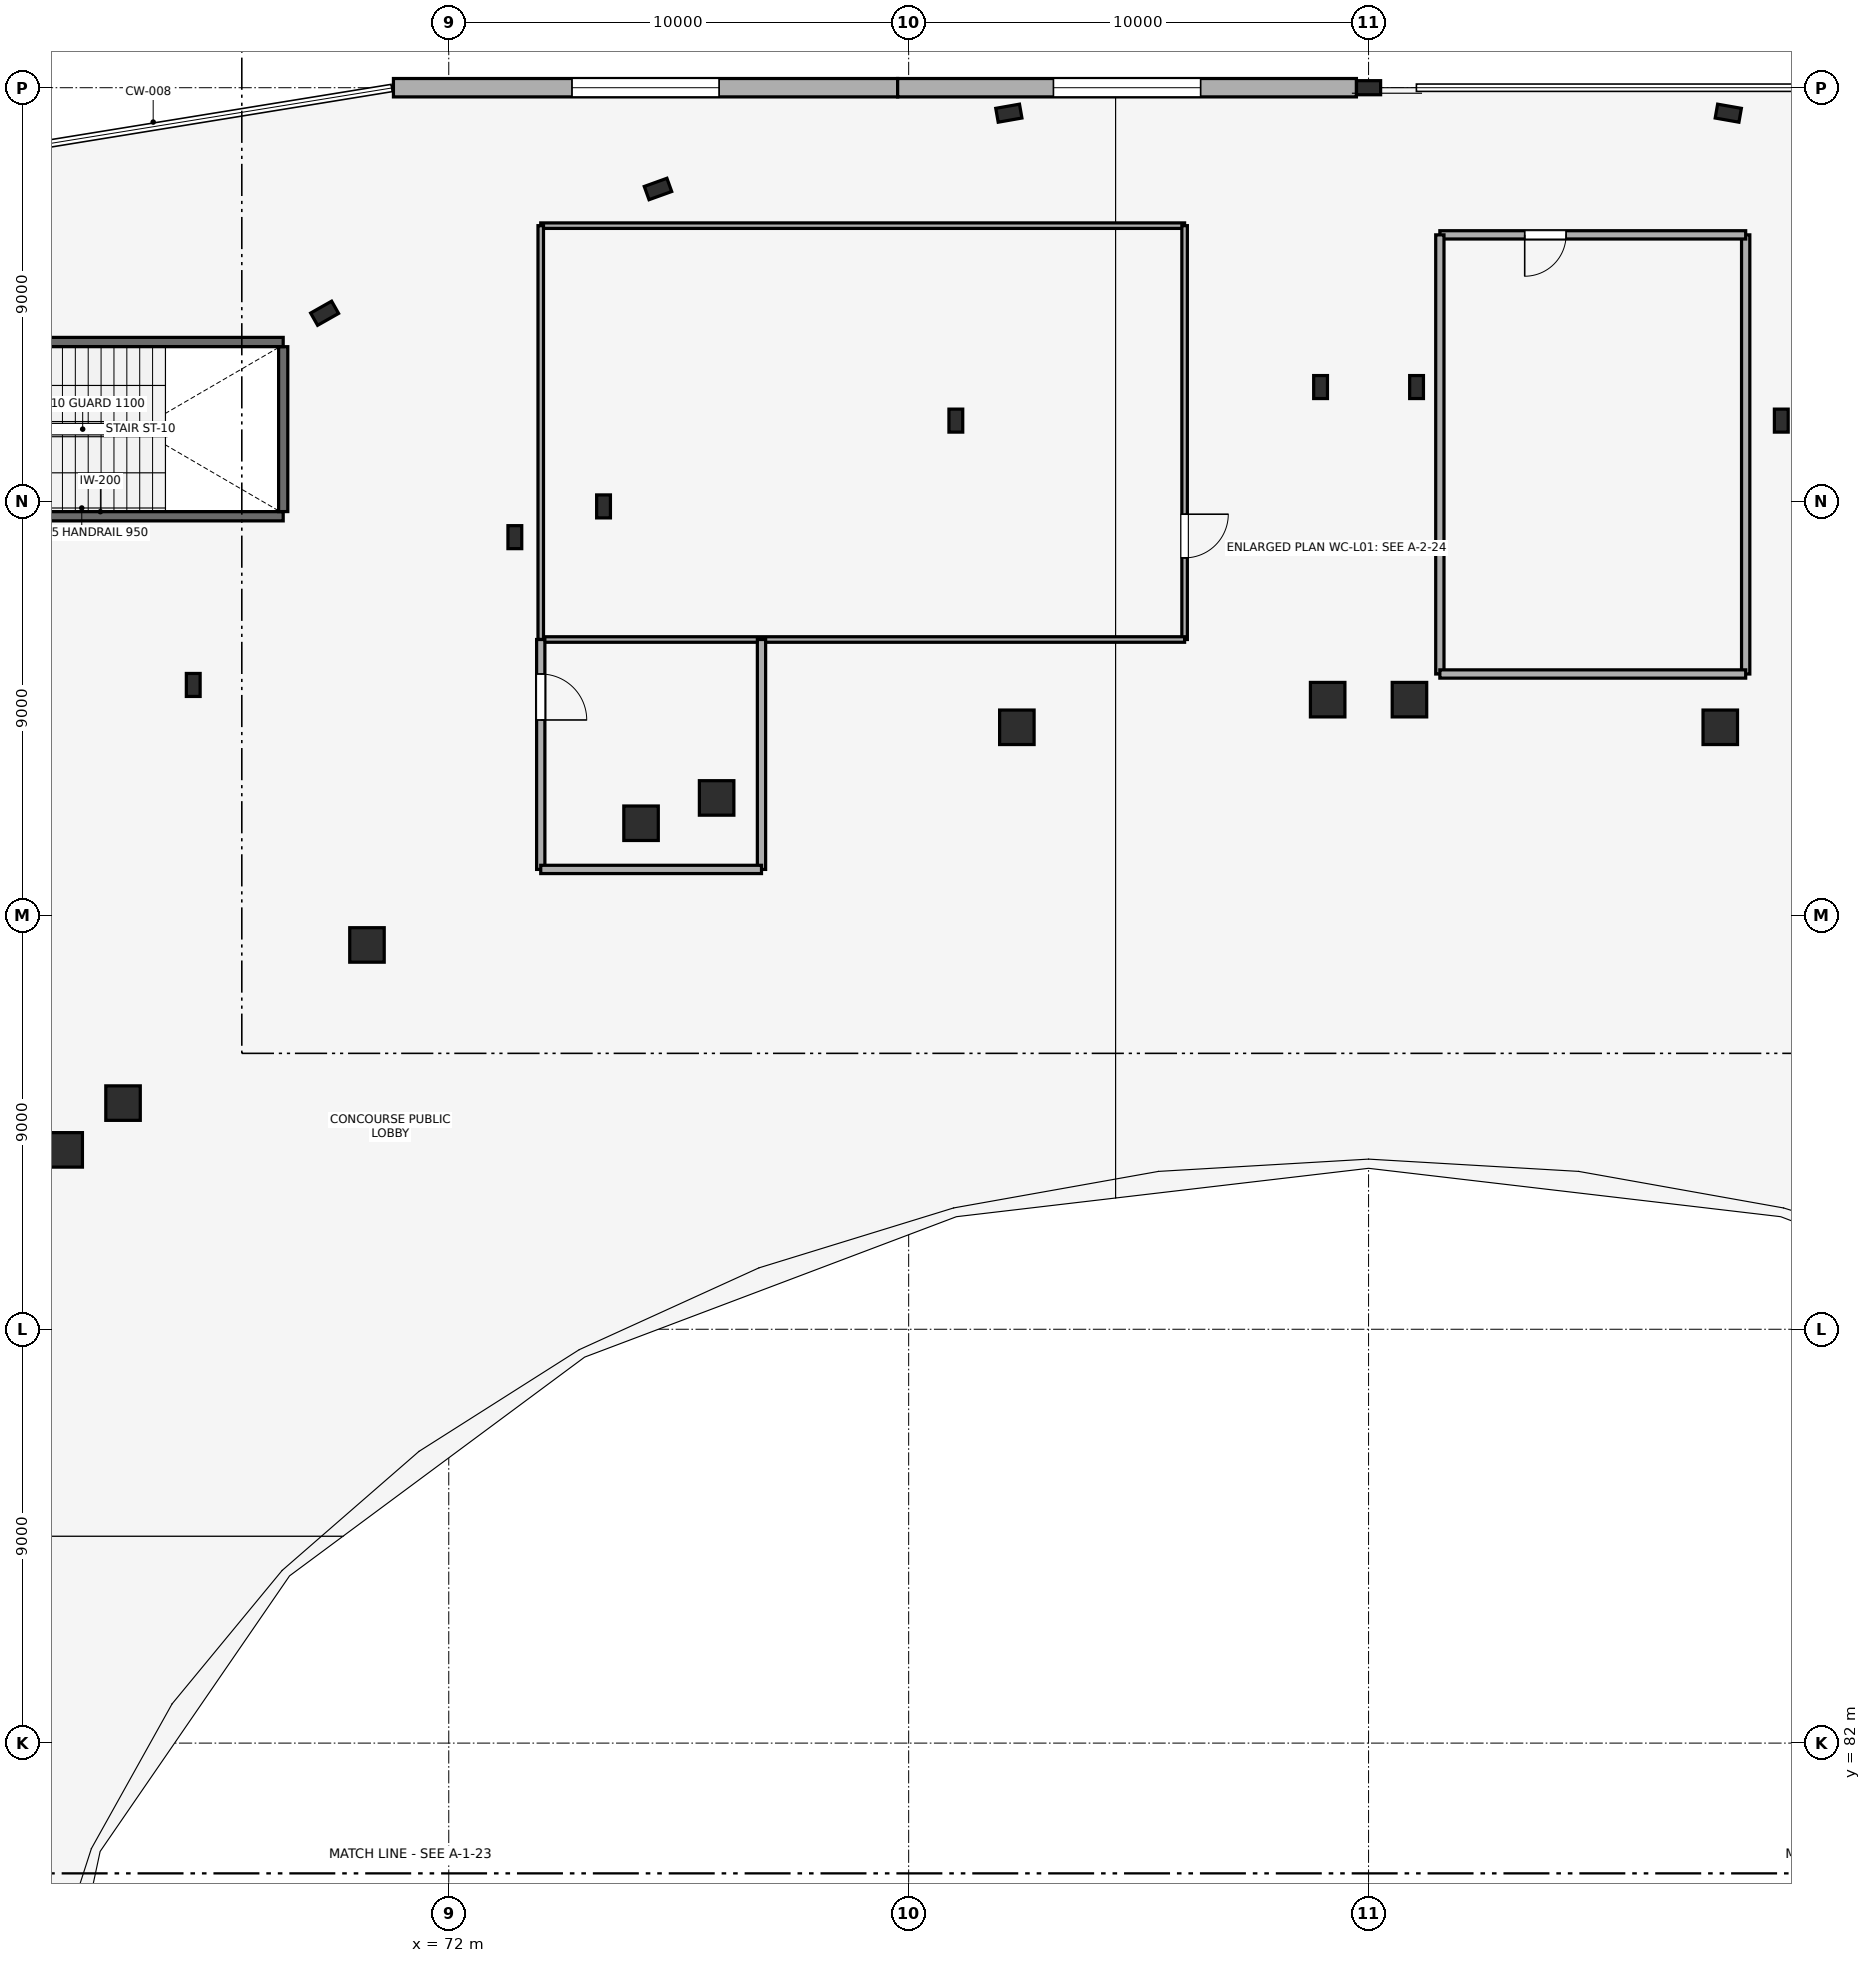
"""IFC4 building model, lengths in metres.
Left out: names, types, materials, properties, quantities, classifications, styles, units other than length and angle.
Written with IfcOpenShell. Run it as: python <this file> out.ifc"""

import sys

from ifc_helpers import new_model, si_unit, direction, frame, frame_2d, origin, origin_2d, place, context, subcontext, project, spatial, rectangle, i_section, extrude, element, fill, save


model = new_model("IFC4")
c1 = context("Model", 3, precision=1e-05, world=origin(), true_north=direction((0.0, 1.0)))
c2 = subcontext(c1, "Body", "Model", "MODEL_VIEW")
j1 = project(units=[si_unit("LENGTHUNIT", "METRE"), si_unit("PLANEANGLEUNIT", "RADIAN")], contexts=[c1])
p1 = place(None, origin())
s1 = spatial("IfcSite", under=j1, at=p1, CompositionType="ELEMENT")
p2 = place(p1, origin())
s2 = spatial("IfcBuilding", under=s1, at=p2, CompositionType="ELEMENT")
p3 = place(p2, frame((0.0, 0.0, 5.4)))
s3 = spatial("IfcBuildingStorey", under=s2, at=p3, CompositionType="ELEMENT", Elevation=5.4)
for number, where, z_axis, x_axis in (
    (1, (99.822, 117.446, 0.0), (0.0, 0.0, 1.0), (0.173, 0.985, 0.0)),
    (2, (92.0, 118.0, 0.0), (0.0, 0.0, 1.0), (0.0, 1.0, 0.0)),
    (3, (84.178, 117.446, 0.0), (0.0, 0.0, 1.0), (-0.173, 0.985, 0.0)),
    (4, (76.549, 115.798, 0.0), (0.0, 0.0, 1.0), (-0.34, 0.941, 0.0)),
    (5, (69.301, 113.095, 0.0), (0.0, 0.0, 1.0), (-0.493, 0.87, 0.0)),
):
    element("IfcColumn", number, at=place(p3, frame(where, z_axis=z_axis, x_axis=x_axis)), inside=s3, PredefinedType="COLUMN", context=c2, shape_type="SweptSolid", body=[
        extrude(i_section(OverallWidth=0.306, OverallDepth=0.524, WebThickness=0.021, FlangeThickness=0.04, FilletRadius=0.027, at=origin_2d()), origin(), (0.0, 0.0, 1.0), 4.8),
    ])
p4 = place(p3, frame((92.889, 104.692, 0.0), z_axis=(0.0, 0.0, 1.0), x_axis=(1.0, 0.0, 0.0)))
e6 = element("IfcColumn", 6, at=p4, inside=s3, PredefinedType="COLUMN", context=c2, shape_type="SweptSolid", body=[
    extrude(rectangle(XDim=0.75, YDim=0.75, at=origin_2d()), origin(), (0.0, 0.0, 1.0), 4.8),
])
p5 = place(p3, frame((93.044, 111.49, 0.0), z_axis=(0.0, 0.0, 1.0), x_axis=(1.0, 0.0, 0.0)))
e7 = element("IfcColumn", 7, at=p5, inside=s3, PredefinedType="COLUMN", context=c2, shape_type="SweptSolid", body=[
    extrude(i_section(OverallWidth=0.3, OverallDepth=0.5, WebThickness=0.014, FlangeThickness=0.028, FilletRadius=0.027, at=origin_2d()), origin(), (0.0, 0.0, 1.0), 4.8),
])
p6 = place(p3, frame((91.111, 104.692, 0.0), z_axis=(0.0, 0.0, 1.0), x_axis=(1.0, 0.0, 0.0)))
e8 = element("IfcColumn", 8, at=p6, inside=s3, PredefinedType="COLUMN", context=c2, shape_type="SweptSolid", body=[
    extrude(rectangle(XDim=0.75, YDim=0.75, at=origin_2d()), origin(), (0.0, 0.0, 1.0), 4.8),
])
p7 = place(p3, frame((90.956, 111.49, 0.0), z_axis=(0.0, 0.0, 1.0), x_axis=(1.0, 0.0, 0.0)))
e9 = element("IfcColumn", 9, at=p7, inside=s3, PredefinedType="COLUMN", context=c2, shape_type="SweptSolid", body=[
    extrude(i_section(OverallWidth=0.3, OverallDepth=0.5, WebThickness=0.014, FlangeThickness=0.028, FilletRadius=0.027, at=origin_2d()), origin(), (0.0, 0.0, 1.0), 4.8),
])
p8 = place(p3, frame((77.824, 102.555, 0.0), z_axis=(0.0, 0.0, 1.0), x_axis=(1.0, 0.0, 0.0)))
e10 = element("IfcColumn", 10, at=p8, inside=s3, PredefinedType="COLUMN", context=c2, shape_type="SweptSolid", body=[
    extrude(rectangle(XDim=0.75, YDim=0.75, at=origin_2d()), origin(), (0.0, 0.0, 1.0), 4.8),
])
p9 = place(p3, frame((75.365, 108.895, 0.0), z_axis=(0.0, 0.0, 1.0), x_axis=(1.0, 0.0, 0.0)))
e11 = element("IfcColumn", 11, at=p9, inside=s3, PredefinedType="COLUMN", context=c2, shape_type="SweptSolid", body=[
    extrude(i_section(OverallWidth=0.3, OverallDepth=0.5, WebThickness=0.014, FlangeThickness=0.028, FilletRadius=0.027, at=origin_2d()), origin(), (0.0, 0.0, 1.0), 4.8),
])
p10 = place(p3, frame((76.181, 102.004, 0.0), z_axis=(0.0, 0.0, 1.0), x_axis=(1.0, 0.0, 0.0)))
e12 = element("IfcColumn", 12, at=p10, inside=s3, PredefinedType="COLUMN", context=c2, shape_type="SweptSolid", body=[
    extrude(rectangle(XDim=0.75, YDim=0.75, at=origin_2d()), origin(), (0.0, 0.0, 1.0), 4.8),
])
p11 = place(p3, frame((73.437, 108.226, 0.0), z_axis=(0.0, 0.0, 1.0), x_axis=(1.0, 0.0, 0.0)))
e13 = element("IfcColumn", 13, at=p11, inside=s3, PredefinedType="COLUMN", context=c2, shape_type="SweptSolid", body=[
    extrude(i_section(OverallWidth=0.3, OverallDepth=0.5, WebThickness=0.014, FlangeThickness=0.028, FilletRadius=0.027, at=origin_2d()), origin(), (0.0, 0.0, 1.0), 4.8),
])
for number, where, z_axis, x_axis in (
    (14, (64.917, 95.918, 0.0), (0.0, 0.0, 1.0), (1.0, 0.0, 0.0)),
    (15, (63.66, 94.901, 0.0), (0.0, 0.0, 1.0), (1.0, 0.0, 0.0)),
    (16, (99.647, 104.091, 0.0), (0.0, 0.0, 1.0), (1.0, 0.0, 0.0)),
):
    element("IfcColumn", number, at=place(p3, frame(where, z_axis=z_axis, x_axis=x_axis)), inside=s3, PredefinedType="COLUMN", context=c2, shape_type="SweptSolid", body=[
        extrude(rectangle(XDim=0.75, YDim=0.75, at=origin_2d()), origin(), (0.0, 0.0, 1.0), 4.8),
    ])
p12 = place(p3, frame((100.974, 110.76, 0.0), z_axis=(0.0, 0.0, 1.0), x_axis=(1.0, 0.0, 0.0)))
e17 = element("IfcColumn", 17, at=p12, inside=s3, PredefinedType="COLUMN", context=c2, shape_type="SweptSolid", body=[
    extrude(i_section(OverallWidth=0.3, OverallDepth=0.5, WebThickness=0.014, FlangeThickness=0.028, FilletRadius=0.027, at=origin_2d()), origin(), (0.0, 0.0, 1.0), 4.8),
])
p13 = place(p3, frame((84.353, 104.091, 0.0), z_axis=(0.0, 0.0, 1.0), x_axis=(1.0, 0.0, 0.0)))
e18 = element("IfcColumn", 18, at=p13, inside=s3, PredefinedType="COLUMN", context=c2, shape_type="SweptSolid", body=[
    extrude(rectangle(XDim=0.75, YDim=0.75, at=origin_2d()), origin(), (0.0, 0.0, 1.0), 4.8),
])
p14 = place(p3, frame((83.026, 110.76, 0.0), z_axis=(0.0, 0.0, 1.0), x_axis=(1.0, 0.0, 0.0)))
e19 = element("IfcColumn", 19, at=p14, inside=s3, PredefinedType="COLUMN", context=c2, shape_type="SweptSolid", body=[
    extrude(i_section(OverallWidth=0.3, OverallDepth=0.5, WebThickness=0.014, FlangeThickness=0.028, FilletRadius=0.027, at=origin_2d()), origin(), (0.0, 0.0, 1.0), 4.8),
])
p15 = place(p3, frame((70.222, 99.358, 0.0), z_axis=(0.0, 0.0, 1.0), x_axis=(1.0, 0.0, 0.0)))
e20 = element("IfcColumn", 20, at=p15, inside=s3, PredefinedType="COLUMN", context=c2, shape_type="SweptSolid", body=[
    extrude(rectangle(XDim=0.75, YDim=0.75, at=origin_2d()), origin(), (0.0, 0.0, 1.0), 4.8),
])
p16 = place(p3, frame((66.444, 105.012, 0.0), z_axis=(0.0, 0.0, 1.0), x_axis=(1.0, 0.0, 0.0)))
e21 = element("IfcColumn", 21, at=p16, inside=s3, PredefinedType="COLUMN", context=c2, shape_type="SweptSolid", body=[
    extrude(i_section(OverallWidth=0.3, OverallDepth=0.5, WebThickness=0.014, FlangeThickness=0.028, FilletRadius=0.027, at=origin_2d()), origin(), (0.0, 0.0, 1.0), 4.8),
])
p17 = place(p3, frame((70.797, 118.0, 0.0), z_axis=(0.0, 0.0, 1.0), x_axis=(1.0, 0.0, 0.0)))
e22 = element("IfcWall", 22, at=p17, inside=s3, PredefinedType="STANDARD", context=c2, shape_type="SweptSolid", body=[
    extrude(rectangle(XDim=10.963, YDim=0.4, at=frame_2d((5.481, 0.0))), origin(), (0.0, 0.0, 1.0), 4.52),
])
p18 = place(p17, frame((3.882, 0.0, 0.95)))
e23 = element("IfcOpeningElement", 23, at=p18, cuts=e22, PredefinedType="OPENING", context=c2, shape_type="SweptSolid", body=[
    extrude(rectangle(XDim=3.2, YDim=1.8, at=frame_2d((1.6, 0.9))), frame((0.0, 0.21, 0.0), z_axis=(0.0, -1.0, 0.0), x_axis=(1.0, 0.0, 0.0)), (0.0, 0.0, 1.0), 0.42),
])
p19 = place(p3, frame((81.76, 118.0, 0.0), z_axis=(0.0, 0.0, 1.0), x_axis=(1.0, 0.0, 0.0)))
e24 = element("IfcWall", 24, at=p19, inside=s3, PredefinedType="STANDARD", context=c2, shape_type="SweptSolid", body=[
    extrude(rectangle(XDim=9.976, YDim=0.4, at=frame_2d((4.988, 0.0))), origin(), (0.0, 0.0, 1.0), 3.832),
])
p20 = place(p19, frame((3.388, 0.0, 0.95)))
e25 = element("IfcOpeningElement", 25, at=p20, cuts=e24, PredefinedType="OPENING", context=c2, shape_type="SweptSolid", body=[
    extrude(rectangle(XDim=3.2, YDim=1.8, at=frame_2d((1.6, 0.9))), frame((0.0, 0.21, 0.0), z_axis=(0.0, -1.0, 0.0), x_axis=(1.0, 0.0, 0.0)), (0.0, 0.0, 1.0), 0.42),
])
p21 = place(p3, frame((60.45, 108.68, 0.0), z_axis=(0.0, 0.0, 1.0), x_axis=(1.0, 0.0, 0.0)))
e26 = element("IfcWall", 26, at=p21, inside=s3, PredefinedType="SHEAR", context=c2, shape_type="SweptSolid", body=[
    extrude(rectangle(XDim=7.95, YDim=0.2, at=frame_2d((3.975, 0.0))), origin(), (0.0, 0.0, 1.0), 4.8),
])
p22 = place(p3, frame((68.4, 108.782, 0.0), z_axis=(0.0, 0.0, 1.0), x_axis=(0.0, 1.0, 0.0)))
e27 = element("IfcWall", 27, at=p22, inside=s3, PredefinedType="SHEAR", context=c2, shape_type="SweptSolid", body=[
    extrude(rectangle(XDim=3.586, YDim=0.2, at=frame_2d((1.793, 0.0))), origin(), (0.0, 0.0, 1.0), 4.8),
])
p23 = place(p3, frame((60.45, 112.47, 0.0), z_axis=(0.0, 0.0, 1.0), x_axis=(1.0, 0.0, 0.0)))
e28 = element("IfcWall", 28, at=p23, inside=s3, PredefinedType="SHEAR", context=c2, shape_type="SweptSolid", body=[
    extrude(rectangle(XDim=7.95, YDim=0.2, at=frame_2d((3.975, 0.0))), origin(), (0.0, 0.0, 1.0), 4.8),
])
p24 = place(p3, frame((74.0, 115.0, 0.0), z_axis=(0.0, 0.0, 1.0), x_axis=(1.0, 0.0, 0.0)))
e29 = element("IfcWall", 29, at=p24, inside=s3, PredefinedType="PARTITIONING", context=c2, shape_type="SweptSolid", body=[
    extrude(rectangle(XDim=14.0, YDim=0.12, at=frame_2d((7.0, 0.0))), origin(), (0.0, 0.0, 1.0), 4.52),
])
p25 = place(p3, frame((88.0, 115.0, 0.0), z_axis=(0.0, 0.0, 1.0), x_axis=(0.0, -1.0, 0.0)))
e30 = element("IfcWall", 30, at=p25, inside=s3, PredefinedType="PARTITIONING", context=c2, shape_type="SweptSolid", body=[
    extrude(rectangle(XDim=9.0, YDim=0.12, at=frame_2d((4.5, 0.0))), origin(), (0.0, 0.0, 1.0), 4.52),
])
p26 = place(p25, frame((6.275, 0.0, 0.0)))
e31 = element("IfcOpeningElement", 31, at=p26, cuts=e30, PredefinedType="OPENING", context=c2, shape_type="SweptSolid", body=[
    extrude(rectangle(XDim=0.95, YDim=2.1, at=frame_2d((0.475, 1.05))), frame((0.0, 0.07, 0.0), z_axis=(0.0, -1.0, 0.0), x_axis=(1.0, 0.0, 0.0)), (0.0, 0.0, 1.0), 0.14),
])
p27 = place(p3, frame((88.0, 106.0, 0.0), z_axis=(0.0, 0.0, 1.0), x_axis=(-1.0, 0.0, 0.0)))
e32 = element("IfcWall", 32, at=p27, inside=s3, PredefinedType="PARTITIONING", context=c2, shape_type="SweptSolid", body=[
    extrude(rectangle(XDim=14.0, YDim=0.12, at=frame_2d((7.0, 0.0))), origin(), (0.0, 0.0, 1.0), 4.52),
])
p28 = place(p3, frame((74.0, 106.0, 0.0), z_axis=(0.0, 0.0, 1.0), x_axis=(0.0, 1.0, 0.0)))
e33 = element("IfcWall", 33, at=p28, inside=s3, PredefinedType="PARTITIONING", context=c2, shape_type="SweptSolid", body=[
    extrude(rectangle(XDim=9.0, YDim=0.12, at=frame_2d((4.5, 0.0))), origin(), (0.0, 0.0, 1.0), 4.52),
])
p29 = place(p3, frame((100.2, 105.25, 0.0), z_axis=(0.0, 0.0, 1.0), x_axis=(0.0, 1.0, 0.0)))
e34 = element("IfcWall", 34, at=p29, inside=s3, PredefinedType="PARTITIONING", context=c2, shape_type="SweptSolid", body=[
    extrude(rectangle(XDim=9.55, YDim=0.18, at=frame_2d((4.775, 0.0))), origin(), (0.0, 0.0, 1.0), 4.52),
])
p30 = place(p3, frame((100.2, 114.8, 0.0), z_axis=(0.0, 0.0, 1.0), x_axis=(-1.0, 0.0, 0.0)))
e35 = element("IfcWall", 35, at=p30, inside=s3, PredefinedType="PARTITIONING", context=c2, shape_type="SweptSolid", body=[
    extrude(rectangle(XDim=6.65, YDim=0.18, at=frame_2d((3.325, 0.0))), origin(), (0.0, 0.0, 1.0), 4.52),
])
p31 = place(p30, frame((3.905, 0.0, 0.0)))
e36 = element("IfcOpeningElement", 36, at=p31, cuts=e35, PredefinedType="OPENING", context=c2, shape_type="SweptSolid", body=[
    extrude(rectangle(XDim=0.9, YDim=2.1, at=frame_2d((0.45, 1.05))), frame((0.0, 0.1, 0.0), z_axis=(0.0, -1.0, 0.0), x_axis=(1.0, 0.0, 0.0)), (0.0, 0.0, 1.0), 0.2),
])
p32 = place(p3, frame((93.55, 114.8, 0.0), z_axis=(0.0, 0.0, 1.0), x_axis=(0.0, -1.0, 0.0)))
e37 = element("IfcWall", 37, at=p32, inside=s3, PredefinedType="PARTITIONING", context=c2, shape_type="SweptSolid", body=[
    extrude(rectangle(XDim=9.55, YDim=0.18, at=frame_2d((4.775, 0.0))), origin(), (0.0, 0.0, 1.0), 4.52),
])
p33 = place(p3, frame((93.55, 105.25, 0.0), z_axis=(0.0, 0.0, 1.0), x_axis=(1.0, 0.0, 0.0)))
e38 = element("IfcWall", 38, at=p33, inside=s3, PredefinedType="PARTITIONING", context=c2, shape_type="SweptSolid", body=[
    extrude(rectangle(XDim=6.65, YDim=0.18, at=frame_2d((3.325, 0.0))), origin(), (0.0, 0.0, 1.0), 4.52),
])
p34 = place(p3, frame((78.8, 101.0, 0.0), z_axis=(0.0, 0.0, 1.0), x_axis=(0.0, 1.0, 0.0)))
e39 = element("IfcWall", 39, at=p34, inside=s3, PredefinedType="PARTITIONING", context=c2, shape_type="SweptSolid", body=[
    extrude(rectangle(XDim=5.0, YDim=0.18, at=frame_2d((2.5, 0.0))), origin(), (0.0, 0.0, 1.0), 4.52),
])
p35 = place(p3, frame((74.0, 106.0, 0.0), z_axis=(0.0, 0.0, 1.0), x_axis=(0.0, -1.0, 0.0)))
e40 = element("IfcWall", 40, at=p35, inside=s3, PredefinedType="PARTITIONING", context=c2, shape_type="SweptSolid", body=[
    extrude(rectangle(XDim=5.0, YDim=0.18, at=frame_2d((2.5, 0.0))), origin(), (0.0, 0.0, 1.0), 4.52),
])
p36 = place(p35, frame((0.75, 0.0, 0.0)))
e41 = element("IfcOpeningElement", 41, at=p36, cuts=e40, PredefinedType="OPENING", context=c2, shape_type="SweptSolid", body=[
    extrude(rectangle(XDim=1.0, YDim=2.15, at=frame_2d((0.5, 1.075))), frame((0.0, 0.1, 0.0), z_axis=(0.0, -1.0, 0.0), x_axis=(1.0, 0.0, 0.0)), (0.0, 0.0, 1.0), 0.2),
])
p37 = place(p3, frame((74.0, 101.0, 0.0), z_axis=(0.0, 0.0, 1.0), x_axis=(1.0, 0.0, 0.0)))
e42 = element("IfcWall", 42, at=p37, inside=s3, PredefinedType="PARTITIONING", context=c2, shape_type="SweptSolid", body=[
    extrude(rectangle(XDim=4.8, YDim=0.18, at=frame_2d((2.4, 0.0))), origin(), (0.0, 0.0, 1.0), 4.52),
])
p38 = place(p18, origin())
e43 = element("IfcWindow", 43, at=p38, inside=s3, PartitioningType="SINGLE_PANEL", PredefinedType="WINDOW", context=c2, shape_type="SweptSolid", body=[
    extrude(rectangle(XDim=3.2, YDim=1.8, at=frame_2d((1.6, 0.9))), frame((0.0, 0.03, 0.0), z_axis=(0.0, -1.0, 0.0), x_axis=(1.0, 0.0, 0.0)), (0.0, 0.0, 1.0), 0.06),
])
fill(e23, e43)
p39 = place(p20, origin())
e44 = element("IfcWindow", 44, at=p39, inside=s3, PartitioningType="SINGLE_PANEL", PredefinedType="WINDOW", context=c2, shape_type="SweptSolid", body=[
    extrude(rectangle(XDim=3.2, YDim=1.8, at=frame_2d((1.6, 0.9))), frame((0.0, 0.03, 0.0), z_axis=(0.0, -1.0, 0.0), x_axis=(1.0, 0.0, 0.0)), (0.0, 0.0, 1.0), 0.06),
])
fill(e25, e44)
p40 = place(p26, origin())
e45 = element("IfcDoor", 45, at=p40, inside=s3, OperationType="SINGLE_SWING_LEFT", PredefinedType="DOOR", context=c2, shape_type="SweptSolid", body=[
    extrude(rectangle(XDim=0.95, YDim=2.1, at=frame_2d((0.475, 1.05))), frame((0.0, 0.025, 0.0), z_axis=(0.0, -1.0, 0.0), x_axis=(1.0, 0.0, 0.0)), (0.0, 0.0, 1.0), 0.05),
])
fill(e31, e45)
p41 = place(p31, origin())
e46 = element("IfcDoor", 46, at=p41, inside=s3, OperationType="SINGLE_SWING_RIGHT", PredefinedType="DOOR", context=c2, shape_type="SweptSolid", body=[
    extrude(rectangle(XDim=0.9, YDim=2.1, at=frame_2d((0.45, 1.05))), frame((0.0, 0.025, 0.0), z_axis=(0.0, -1.0, 0.0), x_axis=(1.0, 0.0, 0.0)), (0.0, 0.0, 1.0), 0.05),
])
fill(e36, e46)
p42 = place(p36, origin())
e47 = element("IfcDoor", 47, at=p42, inside=s3, OperationType="SINGLE_SWING_RIGHT", PredefinedType="DOOR", context=c2, shape_type="SweptSolid", body=[
    extrude(rectangle(XDim=1.0, YDim=2.15, at=frame_2d((0.5, 1.075))), frame((0.0, 0.025, 0.0), z_axis=(0.0, -1.0, 0.0), x_axis=(1.0, 0.0, 0.0)), (0.0, 0.0, 1.0), 0.05),
])
fill(e41, e47)
save(model, sys.argv[1])
